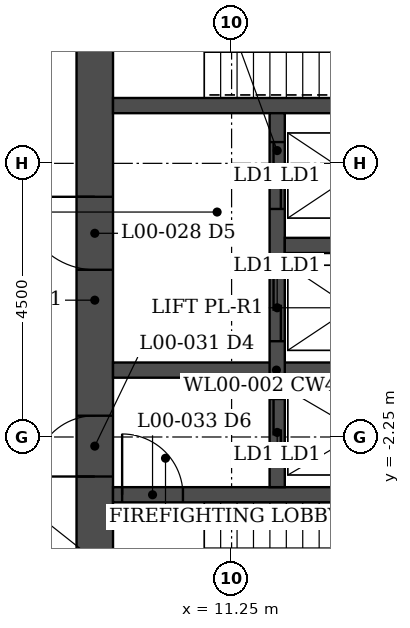
"""IFC4 building model, lengths in metres.
Left out: names, types, materials, properties, quantities, classifications, styles, units other than length and angle.
Written with IfcOpenShell. Run it as: python <this file> out.ifc"""

import sys

from ifc_helpers import new_model, si_unit, direction, frame, frame_2d, origin, place, context, subcontext, project, spatial, rectangle, extrude, element, fill, save


model = new_model("IFC4")
c1 = context("Model", 3, precision=1e-05, world=origin(), true_north=direction((0.0, 1.0)))
c2 = subcontext(c1, "Body", "Model", "MODEL_VIEW")
j1 = project(units=[si_unit("LENGTHUNIT", "METRE"), si_unit("PLANEANGLEUNIT", "RADIAN")], contexts=[c1])
p1 = place(None, origin())
s1 = spatial("IfcSite", under=j1, at=p1, CompositionType="ELEMENT")
p2 = place(p1, origin())
s2 = spatial("IfcBuilding", under=s1, at=p2, CompositionType="ELEMENT")
p3 = place(p2, origin())
s3 = spatial("IfcBuildingStorey", under=s2, at=p3, CompositionType="ELEMENT", Elevation=0.0)
p4 = place(p3, frame((9.0, -6.45, 0.0), z_axis=(0.0, 0.0, 1.0), x_axis=(0.0, 1.0, 0.0)))
e1 = element("IfcWall", 1, at=p4, inside=s3, PredefinedType="SHEAR", context=c2, shape_type="SweptSolid", body=[
    extrude(rectangle(XDim=12.9, YDim=0.6, at=frame_2d((6.45, 0.0))), origin(), (0.0, 0.0, 1.0), 6.0),
])
p5 = place(p4, frame((3.55, 0.0, 0.0)))
e2 = element("IfcOpeningElement", 2, at=p5, cuts=e1, PredefinedType="OPENING", context=c2, shape_type="SweptSolid", body=[
    extrude(rectangle(XDim=1.0, YDim=2.1, at=frame_2d((0.5, 1.05))), frame((0.0, 0.31, 0.0), z_axis=(0.0, -1.0, 0.0), x_axis=(1.0, 0.0, 0.0)), (0.0, 0.0, 1.0), 0.62),
])
p6 = place(p4, frame((6.95, 0.0, 0.0)))
e3 = element("IfcOpeningElement", 3, at=p6, cuts=e1, PredefinedType="OPENING", context=c2, shape_type="SweptSolid", body=[
    extrude(rectangle(XDim=1.2, YDim=2.1, at=frame_2d((0.6, 1.05))), frame((0.0, 0.31, 0.0), z_axis=(0.0, -1.0, 0.0), x_axis=(1.0, 0.0, 0.0)), (0.0, 0.0, 1.0), 0.62),
])
p7 = place(p4, frame((10.85, 0.0, 0.0)))
e4 = element("IfcOpeningElement", 4, at=p7, cuts=e1, PredefinedType="OPENING", context=c2, shape_type="SweptSolid", body=[
    extrude(rectangle(XDim=1.0, YDim=2.1, at=frame_2d((0.5, 1.05))), frame((0.0, 0.31, 0.0), z_axis=(0.0, -1.0, 0.0), x_axis=(1.0, 0.0, 0.0)), (0.0, 0.0, 1.0), 0.62),
])
p8 = place(p3, frame((9.3, -3.2, 0.0), z_axis=(0.0, 0.0, 1.0), x_axis=(1.0, 0.0, 0.0)))
e5 = element("IfcWall", 5, at=p8, inside=s3, PredefinedType="SHEAR", context=c2, shape_type="SweptSolid", body=[
    extrude(rectangle(XDim=8.4, YDim=0.25, at=frame_2d((4.2, 0.0))), origin(), (0.0, 0.0, 1.0), 6.0),
])
p9 = place(p8, frame((0.15, 0.0, 0.0)))
e6 = element("IfcOpeningElement", 6, at=p9, cuts=e5, PredefinedType="OPENING", context=c2, shape_type="SweptSolid", body=[
    extrude(rectangle(XDim=1.0, YDim=2.1, at=frame_2d((0.5, 1.05))), frame((0.0, 0.135, 0.0), z_axis=(0.0, -1.0, 0.0), x_axis=(1.0, 0.0, 0.0)), (0.0, 0.0, 1.0), 0.27),
])
p10 = place(p3, frame((9.3, 3.2, 0.0), z_axis=(0.0, 0.0, 1.0), x_axis=(1.0, 0.0, 0.0)))
e7 = element("IfcWall", 7, at=p10, inside=s3, PredefinedType="SHEAR", context=c2, shape_type="SweptSolid", body=[
    extrude(rectangle(XDim=8.4, YDim=0.25, at=frame_2d((4.2, 0.0))), origin(), (0.0, 0.0, 1.0), 6.0),
])
p11 = place(p3, frame((9.3, -1.15, 0.0), z_axis=(0.0, 0.0, 1.0), x_axis=(1.0, 0.0, 0.0)))
e8 = element("IfcWall", 8, at=p11, inside=s3, PredefinedType="SHEAR", context=c2, shape_type="SweptSolid", body=[
    extrude(rectangle(XDim=5.375, YDim=0.25, at=frame_2d((2.688, 0.0))), origin(), (0.0, 0.0, 1.0), 6.0),
])
p12 = place(p3, frame((12.0, -3.075, 0.0), z_axis=(0.0, 0.0, 1.0), x_axis=(0.0, 1.0, 0.0)))
e9 = element("IfcWall", 9, at=p12, inside=s3, PredefinedType="SHEAR", context=c2, shape_type="SweptSolid", body=[
    extrude(rectangle(XDim=6.15, YDim=0.25, at=frame_2d((3.075, 0.0))), origin(), (0.0, 0.0, 1.0), 6.0),
])
p13 = place(p12, frame((0.35, 0.0, 0.0)))
e10 = element("IfcOpeningElement", 10, at=p13, cuts=e9, PredefinedType="OPENING", context=c2, shape_type="SweptSolid", body=[
    extrude(rectangle(XDim=1.1, YDim=2.1, at=frame_2d((0.55, 1.05))), frame((0.0, 0.135, 0.0), z_axis=(0.0, -1.0, 0.0), x_axis=(1.0, 0.0, 0.0)), (0.0, 0.0, 1.0), 0.27),
])
p14 = place(p12, frame((2.4, 0.0, 0.0)))
e11 = element("IfcOpeningElement", 11, at=p14, cuts=e9, PredefinedType="OPENING", context=c2, shape_type="SweptSolid", body=[
    extrude(rectangle(XDim=1.1, YDim=2.1, at=frame_2d((0.55, 1.05))), frame((0.0, 0.135, 0.0), z_axis=(0.0, -1.0, 0.0), x_axis=(1.0, 0.0, 0.0)), (0.0, 0.0, 1.0), 0.27),
])
p15 = place(p12, frame((4.575, 0.0, 0.0)))
e12 = element("IfcOpeningElement", 12, at=p15, cuts=e9, PredefinedType="OPENING", context=c2, shape_type="SweptSolid", body=[
    extrude(rectangle(XDim=1.1, YDim=2.1, at=frame_2d((0.55, 1.05))), frame((0.0, 0.135, 0.0), z_axis=(0.0, -1.0, 0.0), x_axis=(1.0, 0.0, 0.0)), (0.0, 0.0, 1.0), 0.27),
])
p16 = place(p3, frame((12.125, 0.9, 0.0), z_axis=(0.0, 0.0, 1.0), x_axis=(1.0, 0.0, 0.0)))
e13 = element("IfcWall", 13, at=p16, inside=s3, PredefinedType="SHEAR", context=c2, shape_type="SweptSolid", body=[
    extrude(rectangle(XDim=2.55, YDim=0.25, at=frame_2d((1.275, 0.0))), origin(), (0.0, 0.0, 1.0), 6.0),
])
p17 = place(p5, origin())
e14 = element("IfcDoor", 14, at=p17, inside=s3, OperationType="SINGLE_SWING_LEFT", PredefinedType="DOOR", context=c2, shape_type="SweptSolid", body=[
    extrude(rectangle(XDim=1.0, YDim=2.1, at=frame_2d((0.5, 1.05))), frame((0.0, 0.025, 0.0), z_axis=(0.0, -1.0, 0.0), x_axis=(1.0, 0.0, 0.0)), (0.0, 0.0, 1.0), 0.05),
])
fill(e2, e14)
p18 = place(p9, origin())
e15 = element("IfcDoor", 15, at=p18, inside=s3, OperationType="SINGLE_SWING_LEFT", PredefinedType="DOOR", context=c2, shape_type="SweptSolid", body=[
    extrude(rectangle(XDim=1.0, YDim=2.1, at=frame_2d((0.5, 1.05))), frame((0.0, 0.025, 0.0), z_axis=(0.0, -1.0, 0.0), x_axis=(1.0, 0.0, 0.0)), (0.0, 0.0, 1.0), 0.05),
])
fill(e6, e15)
p19 = place(p6, origin())
e16 = element("IfcDoor", 16, at=p19, inside=s3, OperationType="SINGLE_SWING_RIGHT", PredefinedType="DOOR", context=c2, shape_type="SweptSolid", body=[
    extrude(rectangle(XDim=1.2, YDim=2.1, at=frame_2d((0.6, 1.05))), frame((0.0, 0.025, 0.0), z_axis=(0.0, -1.0, 0.0), x_axis=(1.0, 0.0, 0.0)), (0.0, 0.0, 1.0), 0.05),
])
fill(e3, e16)
p20 = place(p13, origin())
e17 = element("IfcDoor", 17, at=p20, inside=s3, OperationType="DOUBLE_DOOR_SLIDING", PredefinedType="DOOR", context=c2, shape_type="SweptSolid", body=[
    extrude(rectangle(XDim=1.1, YDim=2.1, at=frame_2d((0.55, 1.05))), frame((0.0, 0.025, 0.0), z_axis=(0.0, -1.0, 0.0), x_axis=(1.0, 0.0, 0.0)), (0.0, 0.0, 1.0), 0.05),
])
fill(e10, e17)
p21 = place(p14, origin())
e18 = element("IfcDoor", 18, at=p21, inside=s3, OperationType="DOUBLE_DOOR_SLIDING", PredefinedType="DOOR", context=c2, shape_type="SweptSolid", body=[
    extrude(rectangle(XDim=1.1, YDim=2.1, at=frame_2d((0.55, 1.05))), frame((0.0, 0.025, 0.0), z_axis=(0.0, -1.0, 0.0), x_axis=(1.0, 0.0, 0.0)), (0.0, 0.0, 1.0), 0.05),
])
fill(e11, e18)
p22 = place(p15, origin())
e19 = element("IfcDoor", 19, at=p22, inside=s3, OperationType="DOUBLE_DOOR_SLIDING", PredefinedType="DOOR", context=c2, shape_type="SweptSolid", body=[
    extrude(rectangle(XDim=1.1, YDim=2.1, at=frame_2d((0.55, 1.05))), frame((0.0, 0.025, 0.0), z_axis=(0.0, -1.0, 0.0), x_axis=(1.0, 0.0, 0.0)), (0.0, 0.0, 1.0), 0.05),
])
fill(e12, e19)
save(model, sys.argv[1])
